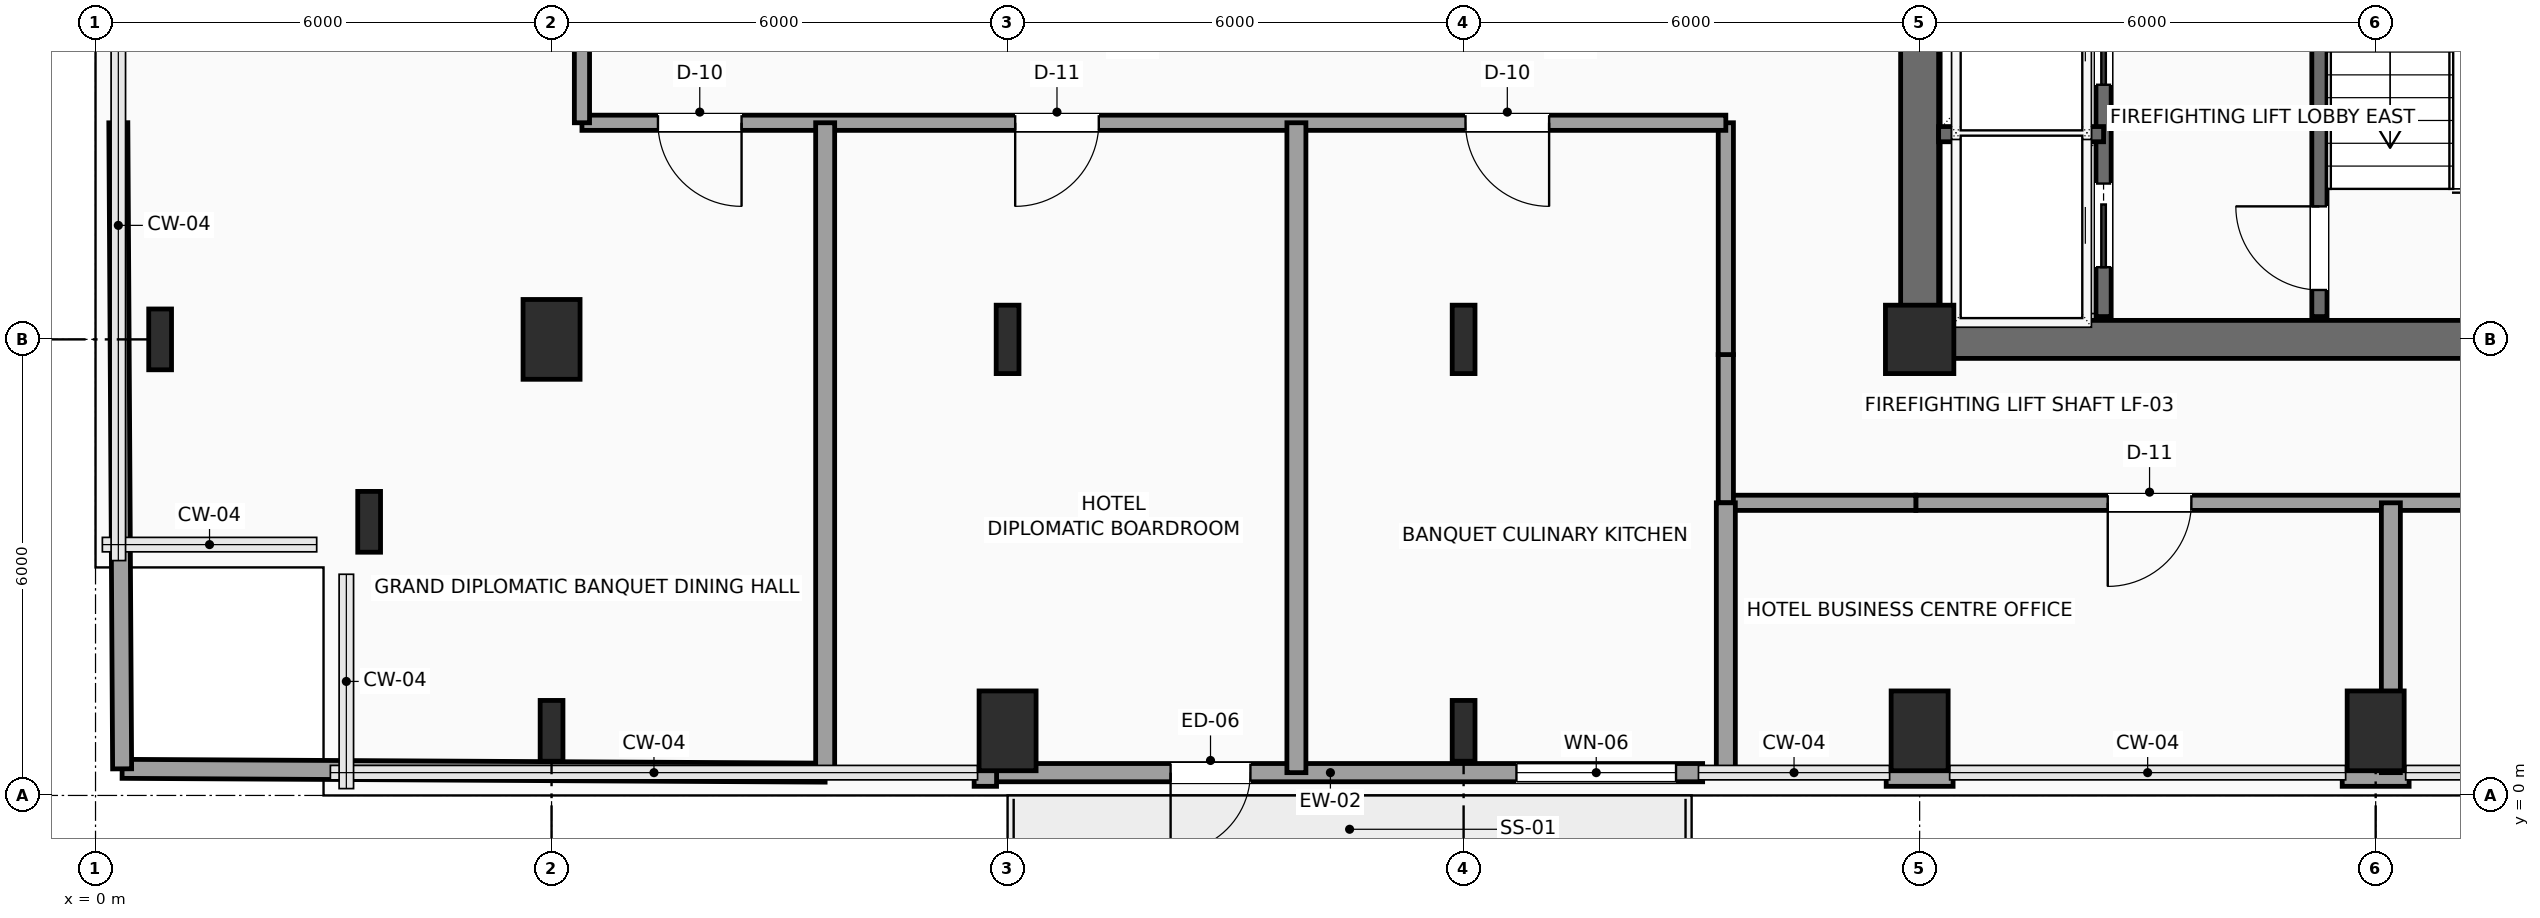
"""IFC4 building model, lengths in metres.
Left out: names, types, materials, properties, quantities, classifications, styles, units other than length and angle.
Written with IfcOpenShell. Run it as: python <this file> out.ifc"""

import sys

from ifc_helpers import new_model, si_unit, direction, frame, frame_2d, origin, origin_2d, place, context, subcontext, project, spatial, rectangle, i_section, extrude, element, fill, save


model = new_model("IFC4")
c1 = context("Model", 3, precision=1e-05, world=origin(), true_north=direction((0.0, 1.0)))
c2 = subcontext(c1, "Body", "Model", "MODEL_VIEW")
j1 = project(units=[si_unit("LENGTHUNIT", "METRE"), si_unit("PLANEANGLEUNIT", "RADIAN")], contexts=[c1])
p1 = place(None, origin())
s1 = spatial("IfcSite", under=j1, at=p1, CompositionType="ELEMENT")
p2 = place(p1, origin())
s2 = spatial("IfcBuilding", under=s1, at=p2, CompositionType="ELEMENT")
p3 = place(p2, frame((0.0, 0.0, 187.95)))
s3 = spatial("IfcBuildingStorey", under=s2, at=p3, CompositionType="ELEMENT", Elevation=187.95)
p4 = place(p3, frame((24.0, 6.0, 0.0), z_axis=(0.0, 0.0, 1.0), x_axis=(1.0, 0.0, 0.0)))
e1 = element("IfcColumn", 1, at=p4, inside=s3, PredefinedType="COLUMN", context=c2, shape_type="SweptSolid", body=[
    extrude(rectangle(XDim=0.9, YDim=0.9, at=origin_2d()), origin(), (0.0, 0.0, 1.0), 3.75),
])
for number, where, z_axis, x_axis in (
    (2, (3.6, 3.6, 0.0), (0.0, 0.0, 1.0), (1.0, 0.0, 0.0)),
    (3, (0.85, 6.0, 0.0), (0.0, 0.0, 1.0), (1.0, 0.0, 0.0)),
    (4, (6.0, 0.85, 0.0), (0.0, 0.0, 1.0), (1.0, 0.0, 0.0)),
):
    element("IfcColumn", number, at=place(p3, frame(where, z_axis=z_axis, x_axis=x_axis)), inside=s3, PredefinedType="COLUMN", context=c2, shape_type="SweptSolid", body=[
        extrude(i_section(OverallWidth=0.3, OverallDepth=0.8, WebThickness=0.018, FlangeThickness=0.033, FilletRadius=0.03, at=origin_2d()), origin(), (0.0, 0.0, 1.0), 3.75),
    ])
for number, where, z_axis, x_axis in (
    (5, (6.0, 6.0, 0.0), (0.0, 0.0, 1.0), (1.0, 0.0, 0.0)),
    (6, (12.0, 0.85, 0.0), (0.0, 0.0, 1.0), (1.0, 0.0, 0.0)),
):
    element("IfcColumn", number, at=place(p3, frame(where, z_axis=z_axis, x_axis=x_axis)), inside=s3, PredefinedType="COLUMN", context=c2, shape_type="SweptSolid", body=[
        extrude(rectangle(XDim=0.75, YDim=1.05, at=origin_2d()), origin(), (0.0, 0.0, 1.0), 3.75),
    ])
p5 = place(p3, frame((12.0, 6.0, 0.0), z_axis=(0.0, 0.0, 1.0), x_axis=(1.0, 0.0, 0.0)))
e7 = element("IfcColumn", 7, at=p5, inside=s3, PredefinedType="COLUMN", context=c2, shape_type="SweptSolid", body=[
    extrude(i_section(OverallWidth=0.3, OverallDepth=0.9, WebThickness=0.019, FlangeThickness=0.035, FilletRadius=0.03, at=origin_2d()), origin(), (0.0, 0.0, 1.0), 3.75),
])
p6 = place(p3, frame((18.0, 0.85, 0.0), z_axis=(0.0, 0.0, 1.0), x_axis=(1.0, 0.0, 0.0)))
e8 = element("IfcColumn", 8, at=p6, inside=s3, PredefinedType="COLUMN", context=c2, shape_type="SweptSolid", body=[
    extrude(i_section(OverallWidth=0.3, OverallDepth=0.8, WebThickness=0.018, FlangeThickness=0.033, FilletRadius=0.03, at=origin_2d()), origin(), (0.0, 0.0, 1.0), 3.75),
])
p7 = place(p3, frame((18.0, 6.0, 0.0), z_axis=(0.0, 0.0, 1.0), x_axis=(1.0, 0.0, 0.0)))
e9 = element("IfcColumn", 9, at=p7, inside=s3, PredefinedType="COLUMN", context=c2, shape_type="SweptSolid", body=[
    extrude(i_section(OverallWidth=0.3, OverallDepth=0.9, WebThickness=0.019, FlangeThickness=0.035, FilletRadius=0.03, at=origin_2d()), origin(), (0.0, 0.0, 1.0), 3.75),
])
for number, where, z_axis, x_axis in (
    (10, (24.0, 0.85, 0.0), (0.0, 0.0, 1.0), (1.0, 0.0, 0.0)),
    (11, (30.0, 0.85, 0.0), (0.0, 0.0, 1.0), (1.0, 0.0, 0.0)),
):
    element("IfcColumn", number, at=place(p3, frame(where, z_axis=z_axis, x_axis=x_axis)), inside=s3, PredefinedType="COLUMN", context=c2, shape_type="SweptSolid", body=[
        extrude(rectangle(XDim=0.75, YDim=1.05, at=origin_2d()), origin(), (0.0, 0.0, 1.0), 3.75),
    ])
p8 = place(p3, frame((21.145, 0.3, 0.0), z_axis=(0.0, 0.0, 1.0), x_axis=(-1.0, 0.0, 0.0)))
e12 = element("IfcWall", 12, at=p8, inside=s3, PredefinedType="SOLIDWALL", context=c2, shape_type="SweptSolid", body=[
    extrude(rectangle(XDim=9.29, YDim=0.24, at=frame_2d((4.645, 0.0))), origin(), (0.0, 0.0, 1.0), 3.54),
])
p9 = place(p8, frame((5.95, 0.0, 0.0)))
e13 = element("IfcOpeningElement", 13, at=p9, cuts=e12, PredefinedType="OPENING", context=c2, shape_type="SweptSolid", body=[
    extrude(rectangle(XDim=1.05, YDim=2.2, at=frame_2d((0.525, 1.1))), frame((0.0, 0.13, 0.0), z_axis=(0.0, -1.0, 0.0), x_axis=(1.0, 0.0, 0.0)), (0.0, 0.0, 1.0), 0.26),
])
p10 = place(p8, frame((0.35, 0.0, 0.85)))
e14 = element("IfcOpeningElement", 14, at=p10, cuts=e12, PredefinedType="OPENING", context=c2, shape_type="SweptSolid", body=[
    extrude(rectangle(XDim=2.1, YDim=2.2, at=frame_2d((1.05, 1.1))), frame((0.0, 0.13, 0.0), z_axis=(0.0, -1.0, 0.0), x_axis=(1.0, 0.0, 0.0)), (0.0, 0.0, 1.0), 0.26),
])
for number, where, z_axis, x_axis in (
    (15, (30.44, 0.24, 0.0), (0.0, 0.0, 1.0), (-1.0, 0.0, 0.0)),
    (16, (24.44, 0.24, 0.0), (0.0, 0.0, 1.0), (-1.0, 0.0, 0.0)),
):
    element("IfcWall", number, at=place(p3, frame(where, z_axis=z_axis, x_axis=x_axis)), inside=s3, PredefinedType="SOLIDWALL", context=c2, shape_type="SweptSolid", body=[
        extrude(rectangle(XDim=0.88, YDim=0.24, at=frame_2d((0.44, 0.0))), origin(), (0.0, 0.0, 1.0), 3.54),
    ])
p11 = place(p3, frame((11.855, 0.24, 0.0), z_axis=(0.0, 0.0, 1.0), x_axis=(-1.0, 0.0, 0.0)))
e17 = element("IfcWall", 17, at=p11, inside=s3, PredefinedType="SOLIDWALL", context=c2, shape_type="SweptSolid", body=[
    extrude(rectangle(XDim=0.295, YDim=0.24, at=frame_2d((0.147, 0.0))), origin(), (0.0, 0.0, 1.0), 3.54),
])
p12 = place(p3, frame((24.0, 6.0, 0.0), z_axis=(0.0, 0.0, 1.0), x_axis=(1.0, 0.0, 0.0)))
e18 = element("IfcWall", 18, at=p12, inside=s3, PredefinedType="SHEAR", context=c2, shape_type="SweptSolid", body=[
    extrude(rectangle(XDim=9.6, YDim=0.5, at=frame_2d((4.8, 0.0))), origin(), (0.0, 0.0, 1.0), 3.54),
])
p13 = place(p3, frame((24.0, 6.0, 0.0), z_axis=(0.0, 0.0, 1.0), x_axis=(0.0, 1.0, 0.0)))
e19 = element("IfcWall", 19, at=p13, inside=s3, PredefinedType="SHEAR", context=c2, shape_type="SweptSolid", body=[
    extrude(rectangle(XDim=12.0, YDim=0.5, at=frame_2d((6.0, 0.0))), origin(), (0.0, 0.0, 1.0), 3.54),
])
p14 = place(p13, frame((7.15, 0.0, 0.0)))
e20 = element("IfcOpeningElement", 20, at=p14, cuts=e19, PredefinedType="OPENING", context=c2, shape_type="SweptSolid", body=[
    extrude(rectangle(XDim=1.6, YDim=2.3, at=frame_2d((0.8, 1.15))), frame((0.0, 0.26, 0.0), z_axis=(0.0, -1.0, 0.0), x_axis=(1.0, 0.0, 0.0)), (0.0, 0.0, 1.0), 0.52),
])
p15 = place(p3, frame((29.26, 6.3, 0.0), z_axis=(0.0, 0.0, 1.0), x_axis=(0.0, 1.0, 0.0)))
e21 = element("IfcWall", 21, at=p15, inside=s3, PredefinedType="SHEAR", context=c2, shape_type="SweptSolid", body=[
    extrude(rectangle(XDim=8.88, YDim=0.2, at=frame_2d((4.44, 0.0))), origin(), (0.0, 0.0, 1.0), 3.54),
])
p16 = place(p15, frame((0.35, 0.0, 0.0)))
e22 = element("IfcOpeningElement", 22, at=p16, cuts=e21, PredefinedType="OPENING", context=c2, shape_type="SweptSolid", body=[
    extrude(rectangle(XDim=1.1, YDim=2.2, at=frame_2d((0.55, 1.1))), frame((0.0, 0.11, 0.0), z_axis=(0.0, -1.0, 0.0), x_axis=(1.0, 0.0, 0.0)), (0.0, 0.0, 1.0), 0.22),
])
p17 = place(p3, frame((26.42, 6.3, 0.0), z_axis=(0.0, 0.0, 1.0), x_axis=(0.0, 1.0, 0.0)))
e23 = element("IfcWall", 23, at=p17, inside=s3, PredefinedType="SHEAR", context=c2, shape_type="SweptSolid", body=[
    extrude(rectangle(XDim=4.95, YDim=0.2, at=frame_2d((2.475, 0.0))), origin(), (0.0, 0.0, 1.0), 3.54),
])
p18 = place(p17, frame((0.65, 0.0, 0.0)))
e24 = element("IfcOpeningElement", 24, at=p18, cuts=e23, PredefinedType="OPENING", context=c2, shape_type="SweptSolid", body=[
    extrude(rectangle(XDim=1.1, YDim=2.2, at=frame_2d((0.55, 1.1))), frame((0.0, 0.11, 0.0), z_axis=(0.0, -1.0, 0.0), x_axis=(1.0, 0.0, 0.0)), (0.0, 0.0, 1.0), 0.22),
])
p19 = place(p17, frame((3.05, 0.0, 0.0)))
e25 = element("IfcOpeningElement", 25, at=p19, cuts=e23, PredefinedType="OPENING", context=c2, shape_type="SweptSolid", body=[
    extrude(rectangle(XDim=1.1, YDim=2.2, at=frame_2d((0.55, 1.1))), frame((0.0, 0.11, 0.0), z_axis=(0.0, -1.0, 0.0), x_axis=(1.0, 0.0, 0.0)), (0.0, 0.0, 1.0), 0.22),
])
p20 = place(p3, frame((24.25, 8.7, 0.0), z_axis=(0.0, 0.0, 1.0), x_axis=(1.0, 0.0, 0.0)))
e26 = element("IfcWall", 26, at=p20, inside=s3, PredefinedType="SHEAR", context=c2, shape_type="SweptSolid", body=[
    extrude(rectangle(XDim=2.17, YDim=0.2, at=frame_2d((1.085, 0.0))), origin(), (0.0, 0.0, 1.0), 3.54),
])
p21 = place(p3, frame((36.35, 3.85, 0.0), z_axis=(0.0, 0.0, 1.0), x_axis=(-1.0, 0.0, 0.0)))
e27 = element("IfcWall", 27, at=p21, inside=s3, PredefinedType="SOLIDWALL", context=c2, shape_type="SweptSolid", body=[
    extrude(rectangle(XDim=12.4, YDim=0.2, at=frame_2d((6.2, 0.0))), origin(), (0.0, 0.0, 1.0), 3.54),
])
p22 = place(p21, frame((8.775, 0.0, 0.0)))
e28 = element("IfcOpeningElement", 28, at=p22, cuts=e27, PredefinedType="OPENING", context=c2, shape_type="SweptSolid", body=[
    extrude(rectangle(XDim=1.1, YDim=2.25, at=frame_2d((0.55, 1.125))), frame((0.0, 0.11, 0.0), z_axis=(0.0, -1.0, 0.0), x_axis=(1.0, 0.0, 0.0)), (0.0, 0.0, 1.0), 0.22),
])
p23 = place(p3, frame((23.95, 3.85, 0.0), z_axis=(0.0, 0.0, 1.0), x_axis=(-1.0, 0.0, 0.0)))
e29 = element("IfcWall", 29, at=p23, inside=s3, PredefinedType="SOLIDWALL", context=c2, shape_type="SweptSolid", body=[
    extrude(rectangle(XDim=2.5, YDim=0.2, at=frame_2d((1.25, 0.0))), origin(), (0.0, 0.0, 1.0), 3.54),
])
p24 = place(p3, frame((21.45, 3.85, 0.0), z_axis=(0.0, 0.0, 1.0), x_axis=(0.0, 1.0, 0.0)))
e30 = element("IfcWall", 30, at=p24, inside=s3, PredefinedType="SOLIDWALL", context=c2, shape_type="SweptSolid", body=[
    extrude(rectangle(XDim=1.95, YDim=0.2, at=frame_2d((0.975, 0.0))), origin(), (0.0, 0.0, 1.0), 3.54),
])
p25 = place(p3, frame((21.45, 5.8, 0.0), z_axis=(0.0, 0.0, 1.0), x_axis=(0.0, 1.0, 0.0)))
e31 = element("IfcWall", 31, at=p25, inside=s3, PredefinedType="SOLIDWALL", context=c2, shape_type="SweptSolid", body=[
    extrude(rectangle(XDim=3.05, YDim=0.2, at=frame_2d((1.525, 0.0))), origin(), (0.0, 0.0, 1.0), 3.54),
])
p26 = place(p3, frame((21.45, 8.85, 0.0), z_axis=(0.0, 0.0, 1.0), x_axis=(-1.0, 0.0, 0.0)))
e32 = element("IfcWall", 32, at=p26, inside=s3, PredefinedType="SOLIDWALL", context=c2, shape_type="SweptSolid", body=[
    extrude(rectangle(XDim=15.05, YDim=0.2, at=frame_2d((7.525, 0.0))), origin(), (0.0, 0.0, 1.0), 3.132),
])
p27 = place(p26, frame((12.95, 0.0, 0.0)))
e33 = element("IfcOpeningElement", 33, at=p27, cuts=e32, PredefinedType="OPENING", context=c2, shape_type="SweptSolid", body=[
    extrude(rectangle(XDim=1.1, YDim=2.25, at=frame_2d((0.55, 1.125))), frame((0.0, 0.11, 0.0), z_axis=(0.0, -1.0, 0.0), x_axis=(1.0, 0.0, 0.0)), (0.0, 0.0, 1.0), 0.22),
])
p28 = place(p26, frame((8.25, 0.0, 0.0)))
e34 = element("IfcOpeningElement", 34, at=p28, cuts=e32, PredefinedType="OPENING", context=c2, shape_type="SweptSolid", body=[
    extrude(rectangle(XDim=1.1, YDim=2.25, at=frame_2d((0.55, 1.125))), frame((0.0, 0.11, 0.0), z_axis=(0.0, -1.0, 0.0), x_axis=(1.0, 0.0, 0.0)), (0.0, 0.0, 1.0), 0.22),
])
p29 = place(p26, frame((2.325, 0.0, 0.0)))
e35 = element("IfcOpeningElement", 35, at=p29, cuts=e32, PredefinedType="OPENING", context=c2, shape_type="SweptSolid", body=[
    extrude(rectangle(XDim=1.1, YDim=2.25, at=frame_2d((0.55, 1.125))), frame((0.0, 0.11, 0.0), z_axis=(0.0, -1.0, 0.0), x_axis=(1.0, 0.0, 0.0)), (0.0, 0.0, 1.0), 0.22),
])
p30 = place(p3, frame((6.4, 8.85, 0.0), z_axis=(0.0, 0.0, 1.0), x_axis=(0.0, 1.0, 0.0)))
e36 = element("IfcWall", 36, at=p30, inside=s3, PredefinedType="SOLIDWALL", context=c2, shape_type="SweptSolid", body=[
    extrude(rectangle(XDim=1.7, YDim=0.2, at=frame_2d((0.85, 0.0))), origin(), (0.0, 0.0, 1.0), 3.54),
])
for number, where, z_axis, x_axis in (
    (37, (21.45, 0.3, 0.0), (0.0, 0.0, 1.0), (0.0, 1.0, 0.0)),
    (38, (30.2, 0.3, 0.0), (0.0, 0.0, 1.0), (0.0, 1.0, 0.0)),
):
    element("IfcWall", number, at=place(p3, frame(where, z_axis=z_axis, x_axis=x_axis)), inside=s3, PredefinedType="PARTITIONING", context=c2, shape_type="SweptSolid", body=[
        extrude(rectangle(XDim=3.55, YDim=0.25, at=frame_2d((1.775, 0.0))), origin(), (0.0, 0.0, 1.0), 3.54),
    ])
p31 = place(p3, frame((0.35, 0.35, 0.0), z_axis=(0.0, 0.0, 1.0), x_axis=(0.99998536257, -0.005410604923, 0.0)))
e39 = element("IfcWall", 39, at=p31, inside=s3, PredefinedType="PARTITIONING", context=c2, shape_type="SweptSolid", body=[
    extrude(rectangle(XDim=9.25, YDim=0.25, at=frame_2d((4.625, 0.0))), origin(), (0.0, 0.0, 1.0), 3.54),
])
p32 = place(p3, frame((0.35, 0.35, 0.0), z_axis=(0.0, 0.0, 1.0), x_axis=(-0.00588799536, 0.999982665605, 0.0)))
e40 = element("IfcWall", 40, at=p32, inside=s3, PredefinedType="PARTITIONING", context=c2, shape_type="SweptSolid", body=[
    extrude(rectangle(XDim=8.5, YDim=0.25, at=frame_2d((4.25, 0.0))), origin(), (0.0, 0.0, 1.0), 3.54),
])
for number, where, z_axis, x_axis in (
    (41, (9.6, 0.3, 0.0), (0.0, 0.0, 1.0), (0.0, 1.0, 0.0)),
    (42, (15.8, 0.3, 0.0), (0.0, 0.0, 1.0), (0.0, 1.0, 0.0)),
):
    element("IfcWall", number, at=place(p3, frame(where, z_axis=z_axis, x_axis=x_axis)), inside=s3, PredefinedType="PARTITIONING", context=c2, shape_type="SweptSolid", body=[
        extrude(rectangle(XDim=8.55, YDim=0.25, at=frame_2d((4.275, 0.0))), origin(), (0.0, 0.0, 1.0), 3.54),
    ])
p33 = place(p9, origin())
e43 = element("IfcDoor", 43, at=p33, inside=s3, OperationType="SINGLE_SWING_RIGHT", PredefinedType="DOOR", context=c2, shape_type="SweptSolid", body=[
    extrude(rectangle(XDim=1.05, YDim=2.2, at=frame_2d((0.525, 1.1))), frame((0.0, 0.025, 0.0), z_axis=(0.0, -1.0, 0.0), x_axis=(1.0, 0.0, 0.0)), (0.0, 0.0, 1.0), 0.05),
])
fill(e13, e43)
p34 = place(p10, origin())
e44 = element("IfcWindow", 44, at=p34, inside=s3, PartitioningType="SINGLE_PANEL", PredefinedType="WINDOW", context=c2, shape_type="SweptSolid", body=[
    extrude(rectangle(XDim=2.1, YDim=2.2, at=frame_2d((1.05, 1.1))), frame((0.0, 0.03, 0.0), z_axis=(0.0, -1.0, 0.0), x_axis=(1.0, 0.0, 0.0)), (0.0, 0.0, 1.0), 0.06),
])
fill(e14, e44)
p35 = place(p16, origin())
e45 = element("IfcDoor", 45, at=p35, inside=s3, OperationType="SINGLE_SWING_RIGHT", PredefinedType="DOOR", context=c2, shape_type="SweptSolid", body=[
    extrude(rectangle(XDim=1.1, YDim=2.2, at=frame_2d((0.55, 1.1))), frame((0.0, 0.025, 0.0), z_axis=(0.0, -1.0, 0.0), x_axis=(1.0, 0.0, 0.0)), (0.0, 0.0, 1.0), 0.05),
])
fill(e22, e45)
p36 = place(p18, origin())
e46 = element("IfcDoor", 46, at=p36, inside=s3, OperationType="SLIDING_TO_LEFT", PredefinedType="DOOR", context=c2, shape_type="SweptSolid", body=[
    extrude(rectangle(XDim=1.1, YDim=2.2, at=frame_2d((0.55, 1.1))), frame((0.0, 0.025, 0.0), z_axis=(0.0, -1.0, 0.0), x_axis=(1.0, 0.0, 0.0)), (0.0, 0.0, 1.0), 0.05),
])
fill(e24, e46)
p37 = place(p19, origin())
e47 = element("IfcDoor", 47, at=p37, inside=s3, OperationType="SLIDING_TO_LEFT", PredefinedType="DOOR", context=c2, shape_type="SweptSolid", body=[
    extrude(rectangle(XDim=1.1, YDim=2.2, at=frame_2d((0.55, 1.1))), frame((0.0, 0.025, 0.0), z_axis=(0.0, -1.0, 0.0), x_axis=(1.0, 0.0, 0.0)), (0.0, 0.0, 1.0), 0.05),
])
fill(e25, e47)
p38 = place(p22, origin())
e48 = element("IfcDoor", 48, at=p38, inside=s3, OperationType="SINGLE_SWING_RIGHT", PredefinedType="DOOR", context=c2, shape_type="SweptSolid", body=[
    extrude(rectangle(XDim=1.1, YDim=2.25, at=frame_2d((0.55, 1.125))), frame((0.0, 0.025, 0.0), z_axis=(0.0, -1.0, 0.0), x_axis=(1.0, 0.0, 0.0)), (0.0, 0.0, 1.0), 0.05),
])
fill(e28, e48)
p39 = place(p27, origin())
e49 = element("IfcDoor", 49, at=p39, inside=s3, OperationType="SINGLE_SWING_LEFT", PredefinedType="DOOR", context=c2, shape_type="SweptSolid", body=[
    extrude(rectangle(XDim=1.1, YDim=2.25, at=frame_2d((0.55, 1.125))), frame((0.0, 0.025, 0.0), z_axis=(0.0, -1.0, 0.0), x_axis=(1.0, 0.0, 0.0)), (0.0, 0.0, 1.0), 0.05),
])
fill(e33, e49)
p40 = place(p28, origin())
e50 = element("IfcDoor", 50, at=p40, inside=s3, OperationType="SINGLE_SWING_RIGHT", PredefinedType="DOOR", context=c2, shape_type="SweptSolid", body=[
    extrude(rectangle(XDim=1.1, YDim=2.25, at=frame_2d((0.55, 1.125))), frame((0.0, 0.025, 0.0), z_axis=(0.0, -1.0, 0.0), x_axis=(1.0, 0.0, 0.0)), (0.0, 0.0, 1.0), 0.05),
])
fill(e34, e50)
p41 = place(p29, origin())
e51 = element("IfcDoor", 51, at=p41, inside=s3, OperationType="SINGLE_SWING_LEFT", PredefinedType="DOOR", context=c2, shape_type="SweptSolid", body=[
    extrude(rectangle(XDim=1.1, YDim=2.25, at=frame_2d((0.55, 1.125))), frame((0.0, 0.025, 0.0), z_axis=(0.0, -1.0, 0.0), x_axis=(1.0, 0.0, 0.0)), (0.0, 0.0, 1.0), 0.05),
])
fill(e35, e51)
save(model, sys.argv[1])
